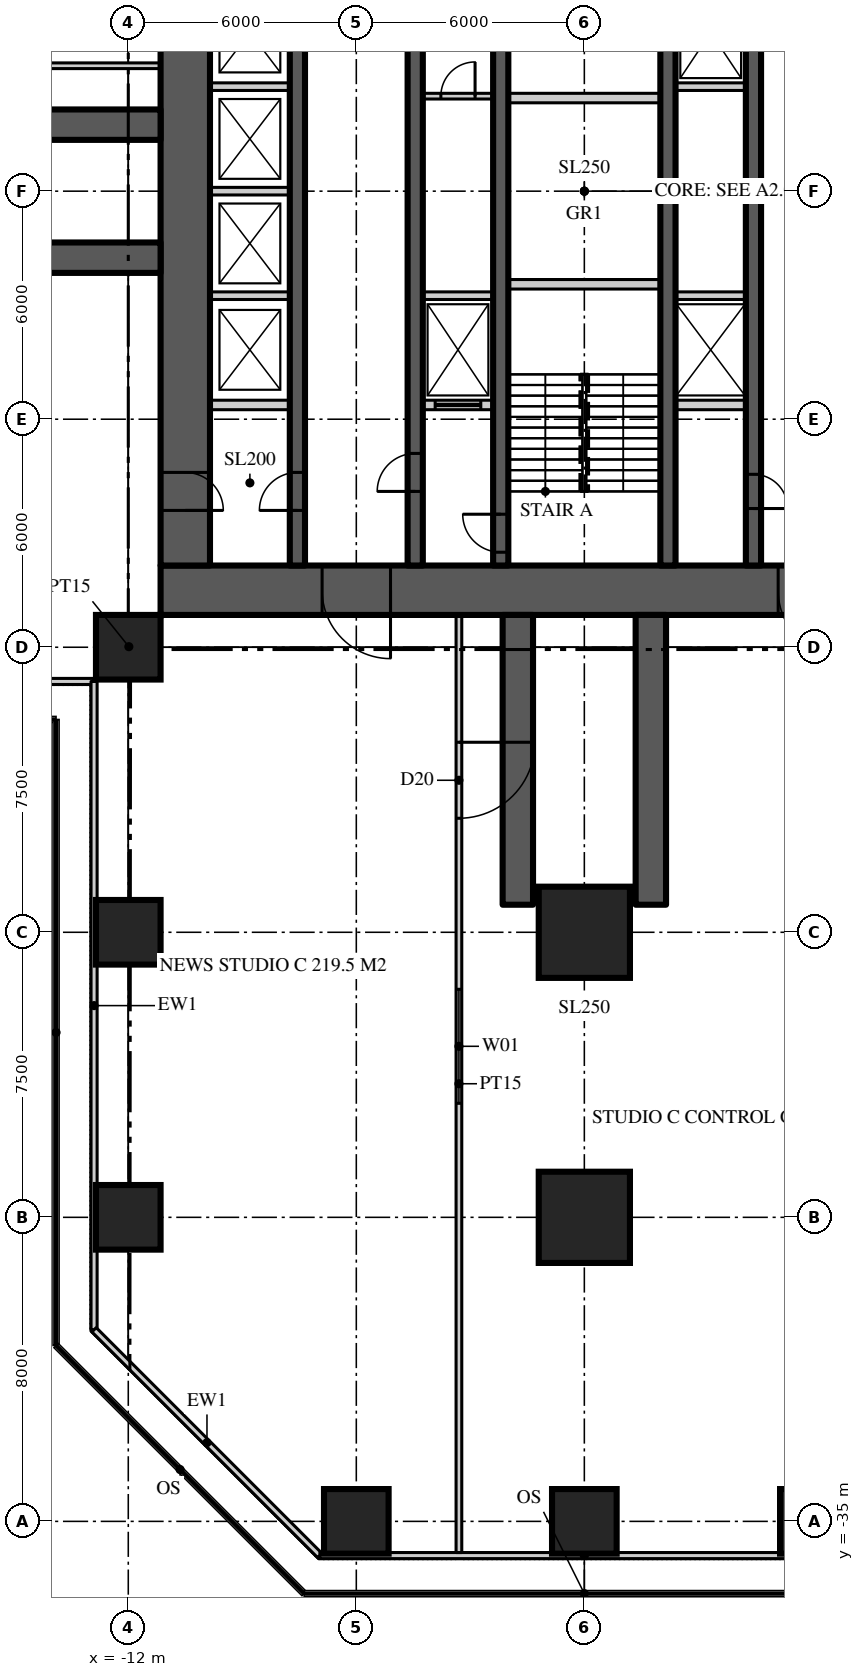
"""IFC4 building model, lengths in metres.
Left out: names, types, materials, properties, quantities, classifications, styles, units other than length and angle.
Written with IfcOpenShell. Run it as: python <this file> out.ifc"""

import sys

from ifc_helpers import new_model, si_unit, direction, frame, frame_2d, origin, origin_2d, place, context, subcontext, project, spatial, rectangle, extrude, element, fill, save


model = new_model("IFC4")
c1 = context("Model", 3, precision=1e-05, world=origin(), true_north=direction((0.0, 1.0)))
c2 = subcontext(c1, "Body", "Model", "MODEL_VIEW")
j1 = project(units=[si_unit("LENGTHUNIT", "METRE"), si_unit("PLANEANGLEUNIT", "RADIAN")], contexts=[c1])
p1 = place(None, origin())
s1 = spatial("IfcSite", under=j1, at=p1, CompositionType="ELEMENT")
p2 = place(p1, origin())
s2 = spatial("IfcBuilding", under=s1, at=p2, CompositionType="ELEMENT")
p3 = place(p2, frame((0.0, 0.0, 7.0)))
s3 = spatial("IfcBuildingStorey", under=s2, at=p3, CompositionType="ELEMENT", Elevation=7.0)
p4 = place(p3, frame((11.15, -10.5, 0.0), z_axis=(0.0, 0.0, 1.0), x_axis=(-1.0, 0.0, 0.0)))
e1 = element("IfcWall", 1, at=p4, inside=s3, PredefinedType="SHEAR", context=c2, shape_type="SweptSolid", body=[
    extrude(rectangle(XDim=22.3, YDim=1.3, at=frame_2d((11.15, 0.0))), origin(), (0.0, 0.0, 1.0), 8.0),
])
p5 = place(p4, frame((16.25, 0.0, 0.0)))
e2 = element("IfcOpeningElement", 2, at=p5, cuts=e1, PredefinedType="OPENING", context=c2, shape_type="SweptSolid", body=[
    extrude(rectangle(XDim=1.8, YDim=2.2, at=frame_2d((0.9, 1.1))), frame((0.0, 0.66, 0.0), z_axis=(0.0, -1.0, 0.0), x_axis=(1.0, 0.0, 0.0)), (0.0, 0.0, 1.0), 1.32),
])
p6 = place(p4, frame((4.25, 0.0, 0.0)))
e3 = element("IfcOpeningElement", 3, at=p6, cuts=e1, PredefinedType="OPENING", context=c2, shape_type="SweptSolid", body=[
    extrude(rectangle(XDim=1.8, YDim=2.2, at=frame_2d((0.9, 1.1))), frame((0.0, 0.66, 0.0), z_axis=(0.0, -1.0, 0.0), x_axis=(1.0, 0.0, 0.0)), (0.0, 0.0, 1.0), 1.32),
])
p7 = place(p3, frame((-10.5, 9.85, 0.0), z_axis=(0.0, 0.0, 1.0), x_axis=(0.0, -1.0, 0.0)))
e4 = element("IfcWall", 4, at=p7, inside=s3, PredefinedType="SHEAR", context=c2, shape_type="SweptSolid", body=[
    extrude(rectangle(XDim=19.7, YDim=1.3, at=frame_2d((9.85, 0.0))), origin(), (0.0, 0.0, 1.0), 8.0),
])
p8 = place(p7, frame((17.25, 0.0, 0.0)))
e5 = element("IfcOpeningElement", 5, at=p8, cuts=e4, PredefinedType="OPENING", context=c2, shape_type="SweptSolid", body=[
    extrude(rectangle(XDim=1.0, YDim=2.2, at=frame_2d((0.5, 1.1))), frame((0.0, 0.66, 0.0), z_axis=(0.0, -1.0, 0.0), x_axis=(1.0, 0.0, 0.0)), (0.0, 0.0, 1.0), 1.32),
])
for number, where, z_axis, x_axis in (
    (6, (-11.15, 1.75, 0.0), (0.0, 0.0, 1.0), (-1.0, 0.0, 0.0)),
    (7, (-11.15, -1.75, 0.0), (0.0, 0.0, 1.0), (-1.0, 0.0, 0.0)),
    (8, (-1.75, -11.15, 0.0), (0.0, 0.0, 1.0), (0.0, -1.0, 0.0)),
    (9, (1.75, -11.15, 0.0), (0.0, 0.0, 1.0), (0.0, -1.0, 0.0)),
):
    element("IfcWall", number, at=place(p3, frame(where, z_axis=z_axis, x_axis=x_axis)), inside=s3, PredefinedType="SHEAR", context=c2, shape_type="SweptSolid", body=[
        extrude(rectangle(XDim=7.625, YDim=0.8, at=frame_2d((3.812, 0.0))), origin(), (0.0, 0.0, 1.0), 8.0),
    ])
for number, where, z_axis, x_axis in (
    (10, (-6.0, -35.0, 0.0), (0.0, 0.0, 1.0), (1.0, 0.0, 0.0)),
    (11, (0.0, -35.0, 0.0), (0.0, 0.0, 1.0), (1.0, 0.0, 0.0)),
    (12, (6.0, -35.0, 0.0), (0.0, 0.0, 1.0), (1.0, 0.0, 0.0)),
    (13, (-12.0, -27.0, 0.0), (0.0, 0.0, 1.0), (1.0, 0.0, 0.0)),
):
    element("IfcColumn", number, at=place(p3, frame(where, z_axis=z_axis, x_axis=x_axis)), inside=s3, PredefinedType="COLUMN", context=c2, shape_type="SweptSolid", body=[
        extrude(rectangle(XDim=1.7, YDim=1.7, at=origin_2d()), origin(), (0.0, 0.0, 1.0), 8.0),
    ])
p9 = place(p3, frame((0.0, -27.0, 0.0), z_axis=(0.0, 0.0, 1.0), x_axis=(1.0, 0.0, 0.0)))
e14 = element("IfcColumn", 14, at=p9, inside=s3, PredefinedType="COLUMN", context=c2, shape_type="SweptSolid", body=[
    extrude(rectangle(XDim=2.4, YDim=2.4, at=origin_2d()), origin(), (0.0, 0.0, 1.0), 8.0),
])
p10 = place(p3, frame((-12.0, -19.5, 0.0), z_axis=(0.0, 0.0, 1.0), x_axis=(1.0, 0.0, 0.0)))
e15 = element("IfcColumn", 15, at=p10, inside=s3, PredefinedType="COLUMN", context=c2, shape_type="SweptSolid", body=[
    extrude(rectangle(XDim=1.7, YDim=1.7, at=origin_2d()), origin(), (0.0, 0.0, 1.0), 8.0),
])
p11 = place(p3, frame((0.0, -19.5, 0.0), z_axis=(0.0, 0.0, 1.0), x_axis=(1.0, 0.0, 0.0)))
e16 = element("IfcColumn", 16, at=p11, inside=s3, PredefinedType="COLUMN", context=c2, shape_type="SweptSolid", body=[
    extrude(rectangle(XDim=2.4, YDim=2.4, at=origin_2d()), origin(), (0.0, 0.0, 1.0), 8.0),
])
p12 = place(p3, frame((-12.0, -12.0, 0.0), z_axis=(0.0, 0.0, 1.0), x_axis=(1.0, 0.0, 0.0)))
e17 = element("IfcColumn", 17, at=p12, inside=s3, PredefinedType="COLUMN", context=c2, shape_type="SweptSolid", body=[
    extrude(rectangle(XDim=1.7, YDim=1.7, at=origin_2d()), origin(), (0.0, 0.0, 1.0), 8.0),
])
for number, where, z_axis, x_axis in (
    (18, (-29.958, -12.9, 0.0), (0.0, 0.0, 1.0), (1.0, 0.0, 0.0)),
    (19, (-12.9, -12.9, 0.0), (0.0, 0.0, 1.0), (0.0, -1.0, 0.0)),
):
    element("IfcWall", number, at=place(p3, frame(where, z_axis=z_axis, x_axis=x_axis)), inside=s3, PredefinedType="SOLIDWALL", context=c2, shape_type="SweptSolid", body=[
        extrude(rectangle(XDim=17.059, YDim=0.16, at=frame_2d((8.529, 0.0))), origin(), (0.0, 0.0, 1.0), 7.75),
    ])
p13 = place(p3, frame((-12.9, -29.958, 0.0), z_axis=(0.0, 0.0, 1.0), x_axis=(0.707106781187, -0.707106781187, 0.0)))
e20 = element("IfcWall", 20, at=p13, inside=s3, PredefinedType="SOLIDWALL", context=c2, shape_type="SweptSolid", body=[
    extrude(rectangle(XDim=8.402, YDim=0.16, at=frame_2d((4.201, 0.0))), origin(), (0.0, 0.0, 1.0), 7.75),
])
p14 = place(p3, frame((-6.958, -35.9, 0.0), z_axis=(0.0, 0.0, 1.0), x_axis=(1.0, 0.0, 0.0)))
e21 = element("IfcWall", 21, at=p14, inside=s3, PredefinedType="SOLIDWALL", context=c2, shape_type="SweptSolid", body=[
    extrude(rectangle(XDim=13.917, YDim=0.16, at=frame_2d((6.958, 0.0))), origin(), (0.0, 0.0, 1.0), 7.75),
])
p15 = place(p3, frame((-7.55, -9.85, 0.0), z_axis=(0.0, 0.0, 1.0), x_axis=(0.0, 1.0, 0.0)))
e22 = element("IfcWall", 22, at=p15, inside=s3, PredefinedType="SHEAR", context=c2, shape_type="SweptSolid", body=[
    extrude(rectangle(XDim=19.7, YDim=0.4, at=frame_2d((9.85, 0.0))), origin(), (0.0, 0.0, 1.0), 8.0),
])
p16 = place(p15, frame((1.45, 0.0, 0.0)))
e23 = element("IfcOpeningElement", 23, at=p16, cuts=e22, PredefinedType="OPENING", context=c2, shape_type="SweptSolid", body=[
    extrude(rectangle(XDim=1.0, YDim=2.2, at=frame_2d((0.5, 1.1))), frame((0.0, 0.21, 0.0), z_axis=(0.0, -1.0, 0.0), x_axis=(1.0, 0.0, 0.0)), (0.0, 0.0, 1.0), 0.42),
])
p17 = place(p15, frame((17.3, 0.0, 0.0)))
e24 = element("IfcOpeningElement", 24, at=p17, cuts=e22, PredefinedType="OPENING", context=c2, shape_type="SweptSolid", body=[
    extrude(rectangle(XDim=0.9, YDim=2.1, at=frame_2d((0.45, 1.05))), frame((0.0, 0.21, 0.0), z_axis=(0.0, -1.0, 0.0), x_axis=(1.0, 0.0, 0.0)), (0.0, 0.0, 1.0), 0.42),
])
p18 = place(p3, frame((-4.45, -9.85, 0.0), z_axis=(0.0, 0.0, 1.0), x_axis=(0.0, 1.0, 0.0)))
e25 = element("IfcWall", 25, at=p18, inside=s3, PredefinedType="SHEAR", context=c2, shape_type="SweptSolid", body=[
    extrude(rectangle(XDim=19.7, YDim=0.4, at=frame_2d((9.85, 0.0))), origin(), (0.0, 0.0, 1.0), 8.0),
])
p19 = place(p18, frame((1.95, 0.0, 0.0)))
e26 = element("IfcOpeningElement", 26, at=p19, cuts=e25, PredefinedType="OPENING", context=c2, shape_type="SweptSolid", body=[
    extrude(rectangle(XDim=1.0, YDim=2.2, at=frame_2d((0.5, 1.1))), frame((0.0, 0.21, 0.0), z_axis=(0.0, -1.0, 0.0), x_axis=(1.0, 0.0, 0.0)), (0.0, 0.0, 1.0), 0.42),
])
p20 = place(p18, frame((17.25, 0.0, 0.0)))
e27 = element("IfcOpeningElement", 27, at=p20, cuts=e25, PredefinedType="OPENING", context=c2, shape_type="SweptSolid", body=[
    extrude(rectangle(XDim=1.0, YDim=2.1, at=frame_2d((0.5, 1.05))), frame((0.0, 0.21, 0.0), z_axis=(0.0, -1.0, 0.0), x_axis=(1.0, 0.0, 0.0)), (0.0, 0.0, 1.0), 0.42),
])
p21 = place(p3, frame((4.45, 9.85, 0.0), z_axis=(0.0, 0.0, 1.0), x_axis=(0.0, -1.0, 0.0)))
e28 = element("IfcWall", 28, at=p21, inside=s3, PredefinedType="SHEAR", context=c2, shape_type="SweptSolid", body=[
    extrude(rectangle(XDim=19.7, YDim=0.4, at=frame_2d((9.85, 0.0))), origin(), (0.0, 0.0, 1.0), 8.0),
])
p22 = place(p21, frame((1.95, 0.0, 0.0)))
e29 = element("IfcOpeningElement", 29, at=p22, cuts=e28, PredefinedType="OPENING", context=c2, shape_type="SweptSolid", body=[
    extrude(rectangle(XDim=1.0, YDim=2.2, at=frame_2d((0.5, 1.1))), frame((0.0, 0.21, 0.0), z_axis=(0.0, -1.0, 0.0), x_axis=(1.0, 0.0, 0.0)), (0.0, 0.0, 1.0), 0.42),
])
p23 = place(p21, frame((17.3, 0.0, 0.0)))
e30 = element("IfcOpeningElement", 30, at=p23, cuts=e28, PredefinedType="OPENING", context=c2, shape_type="SweptSolid", body=[
    extrude(rectangle(XDim=0.9, YDim=2.1, at=frame_2d((0.45, 1.05))), frame((0.0, 0.21, 0.0), z_axis=(0.0, -1.0, 0.0), x_axis=(1.0, 0.0, 0.0)), (0.0, 0.0, 1.0), 0.42),
])
p24 = place(p3, frame((-2.2, -9.85, 0.0), z_axis=(0.0, 0.0, 1.0), x_axis=(0.0, 1.0, 0.0)))
e31 = element("IfcWall", 31, at=p24, inside=s3, PredefinedType="SHEAR", context=c2, shape_type="SweptSolid", body=[
    extrude(rectangle(XDim=19.7, YDim=0.4, at=frame_2d((9.85, 0.0))), origin(), (0.0, 0.0, 1.0), 8.0),
])
p25 = place(p24, frame((0.35, 0.0, 0.0)))
e32 = element("IfcOpeningElement", 32, at=p25, cuts=e31, PredefinedType="OPENING", context=c2, shape_type="SweptSolid", body=[
    extrude(rectangle(XDim=1.0, YDim=2.2, at=frame_2d((0.5, 1.1))), frame((0.0, 0.21, 0.0), z_axis=(0.0, -1.0, 0.0), x_axis=(1.0, 0.0, 0.0)), (0.0, 0.0, 1.0), 0.42),
])
p26 = place(p3, frame((2.2, 9.85, 0.0), z_axis=(0.0, 0.0, 1.0), x_axis=(0.0, -1.0, 0.0)))
e33 = element("IfcWall", 33, at=p26, inside=s3, PredefinedType="SHEAR", context=c2, shape_type="SweptSolid", body=[
    extrude(rectangle(XDim=19.7, YDim=0.4, at=frame_2d((9.85, 0.0))), origin(), (0.0, 0.0, 1.0), 8.0),
])
p27 = place(p26, frame((0.35, 0.0, 0.0)))
e34 = element("IfcOpeningElement", 34, at=p27, cuts=e33, PredefinedType="OPENING", context=c2, shape_type="SweptSolid", body=[
    extrude(rectangle(XDim=1.0, YDim=2.2, at=frame_2d((0.5, 1.1))), frame((0.0, 0.21, 0.0), z_axis=(0.0, -1.0, 0.0), x_axis=(1.0, 0.0, 0.0)), (0.0, 0.0, 1.0), 0.42),
])
p28 = place(p3, frame((-9.85, -5.625, 0.0), z_axis=(0.0, 0.0, 1.0), x_axis=(1.0, 0.0, 0.0)))
e35 = element("IfcWall", 35, at=p28, inside=s3, PredefinedType="SOLIDWALL", context=c2, shape_type="SweptSolid", body=[
    extrude(rectangle(XDim=2.1, YDim=0.25, at=frame_2d((1.05, 0.0))), origin(), (0.0, 0.0, 1.0), 7.8),
])
p29 = place(p3, frame((-4.25, -5.625, 0.0), z_axis=(0.0, 0.0, 1.0), x_axis=(1.0, 0.0, 0.0)))
e36 = element("IfcWall", 36, at=p29, inside=s3, PredefinedType="SOLIDWALL", context=c2, shape_type="SweptSolid", body=[
    extrude(rectangle(XDim=1.85, YDim=0.25, at=frame_2d((0.925, 0.0))), origin(), (0.0, 0.0, 1.0), 7.8),
])
p30 = place(p29, frame((0.325, 0.0, 0.0)))
e37 = element("IfcOpeningElement", 37, at=p30, cuts=e36, PredefinedType="OPENING", context=c2, shape_type="SweptSolid", body=[
    extrude(rectangle(XDim=1.2, YDim=2.2, at=frame_2d((0.6, 1.1))), frame((0.0, 0.135, 0.0), z_axis=(0.0, -1.0, 0.0), x_axis=(1.0, 0.0, 0.0)), (0.0, 0.0, 1.0), 0.27),
])
p31 = place(p3, frame((2.4, -5.625, 0.0), z_axis=(0.0, 0.0, 1.0), x_axis=(1.0, 0.0, 0.0)))
e38 = element("IfcWall", 38, at=p31, inside=s3, PredefinedType="SOLIDWALL", context=c2, shape_type="SweptSolid", body=[
    extrude(rectangle(XDim=1.85, YDim=0.25, at=frame_2d((0.925, 0.0))), origin(), (0.0, 0.0, 1.0), 7.8),
])
for number, where, z_axis, x_axis in (
    (39, (-2.0, -2.45, 0.0), (0.0, 0.0, 1.0), (1.0, 0.0, 0.0)),
    (40, (-2.0, 2.45, 0.0), (0.0, 0.0, 1.0), (1.0, 0.0, 0.0)),
):
    element("IfcWall", number, at=place(p3, frame(where, z_axis=z_axis, x_axis=x_axis)), inside=s3, PredefinedType="SOLIDWALL", context=c2, shape_type="SweptSolid", body=[
        extrude(rectangle(XDim=4.0, YDim=0.25, at=frame_2d((2.0, 0.0))), origin(), (0.0, 0.0, 1.0), 7.8),
    ])
p32 = place(p3, frame((-9.85, -2.75, 0.0), z_axis=(0.0, 0.0, 1.0), x_axis=(1.0, 0.0, 0.0)))
e41 = element("IfcWall", 41, at=p32, inside=s3, PredefinedType="SOLIDWALL", context=c2, shape_type="SweptSolid", body=[
    extrude(rectangle(XDim=2.1, YDim=0.2, at=frame_2d((1.05, 0.0))), origin(), (0.0, 0.0, 1.0), 7.8),
])
for number, where, z_axis, x_axis in (
    (42, (-4.25, -2.75, 0.0), (0.0, 0.0, 1.0), (1.0, 0.0, 0.0)),
    (43, (2.4, -2.75, 0.0), (0.0, 0.0, 1.0), (1.0, 0.0, 0.0)),
):
    element("IfcWall", number, at=place(p3, frame(where, z_axis=z_axis, x_axis=x_axis)), inside=s3, PredefinedType="SOLIDWALL", context=c2, shape_type="SweptSolid", body=[
        extrude(rectangle(XDim=1.85, YDim=0.2, at=frame_2d((0.925, 0.0))), origin(), (0.0, 0.0, 1.0), 7.8),
    ])
for number, where, z_axis, x_axis in (
    (44, (-9.85, 0.0, 0.0), (0.0, 0.0, 1.0), (1.0, 0.0, 0.0)),
    (45, (-9.85, 2.75, 0.0), (0.0, 0.0, 1.0), (1.0, 0.0, 0.0)),
):
    element("IfcWall", number, at=place(p3, frame(where, z_axis=z_axis, x_axis=x_axis)), inside=s3, PredefinedType="SOLIDWALL", context=c2, shape_type="SweptSolid", body=[
        extrude(rectangle(XDim=2.1, YDim=0.2, at=frame_2d((1.05, 0.0))), origin(), (0.0, 0.0, 1.0), 7.8),
    ])
p33 = place(p3, frame((2.4, 2.75, 0.0), z_axis=(0.0, 0.0, 1.0), x_axis=(1.0, 0.0, 0.0)))
e46 = element("IfcWall", 46, at=p33, inside=s3, PredefinedType="SOLIDWALL", context=c2, shape_type="SweptSolid", body=[
    extrude(rectangle(XDim=1.85, YDim=0.2, at=frame_2d((0.925, 0.0))), origin(), (0.0, 0.0, 1.0), 7.8),
])
p34 = place(p3, frame((-11.15, 3.3, 0.0), z_axis=(0.0, 0.0, 1.0), x_axis=(-1.0, 0.0, 0.0)))
e47 = element("IfcWall", 47, at=p34, inside=s3, PredefinedType="PARTITIONING", context=c2, shape_type="SweptSolid", body=[
    extrude(rectangle(XDim=24.67, YDim=0.15, at=frame_2d((12.335, 0.0))), origin(), (0.0, 0.0, 1.0), 7.75),
])
p35 = place(p34, frame((3.35, 0.0, 0.0)))
e48 = element("IfcOpeningElement", 48, at=p35, cuts=e47, PredefinedType="OPENING", context=c2, shape_type="SweptSolid", body=[
    extrude(rectangle(XDim=2.0, YDim=2.6, at=frame_2d((1.0, 1.3))), frame((0.0, 0.085, 0.0), z_axis=(0.0, -1.0, 0.0), x_axis=(1.0, 0.0, 0.0)), (0.0, 0.0, 1.0), 0.17),
])
p36 = place(p34, frame((9.85, 0.0, 0.9)))
e49 = element("IfcOpeningElement", 49, at=p36, cuts=e47, PredefinedType="OPENING", context=c2, shape_type="SweptSolid", body=[
    extrude(rectangle(XDim=3.0, YDim=1.5, at=frame_2d((1.5, 0.75))), frame((0.0, 0.085, 0.0), z_axis=(0.0, -1.0, 0.0), x_axis=(1.0, 0.0, 0.0)), (0.0, 0.0, 1.0), 0.17),
])
p37 = place(p3, frame((-3.3, -11.15, 0.0), z_axis=(0.0, 0.0, 1.0), x_axis=(0.0, -1.0, 0.0)))
e50 = element("IfcWall", 50, at=p37, inside=s3, PredefinedType="PARTITIONING", context=c2, shape_type="SweptSolid", body=[
    extrude(rectangle(XDim=24.67, YDim=0.15, at=frame_2d((12.335, 0.0))), origin(), (0.0, 0.0, 1.0), 7.75),
])
p38 = place(p37, frame((3.35, 0.0, 0.0)))
e51 = element("IfcOpeningElement", 51, at=p38, cuts=e50, PredefinedType="OPENING", context=c2, shape_type="SweptSolid", body=[
    extrude(rectangle(XDim=2.0, YDim=2.6, at=frame_2d((1.0, 1.3))), frame((0.0, 0.085, 0.0), z_axis=(0.0, -1.0, 0.0), x_axis=(1.0, 0.0, 0.0)), (0.0, 0.0, 1.0), 0.17),
])
p39 = place(p37, frame((9.85, 0.0, 0.9)))
e52 = element("IfcOpeningElement", 52, at=p39, cuts=e50, PredefinedType="OPENING", context=c2, shape_type="SweptSolid", body=[
    extrude(rectangle(XDim=3.0, YDim=1.5, at=frame_2d((1.5, 0.75))), frame((0.0, 0.085, 0.0), z_axis=(0.0, -1.0, 0.0), x_axis=(1.0, 0.0, 0.0)), (0.0, 0.0, 1.0), 0.17),
])
p40 = place(p3, frame((-11.15, -11.15, 0.0), z_axis=(0.0, 0.0, 1.0), x_axis=(-0.707106781187, -0.707106781187, 0.0)))
e53 = element("IfcWall", 53, at=p40, inside=s3, PredefinedType="PARTITIONING", context=c2, shape_type="SweptSolid", body=[
    extrude(rectangle(XDim=2.362, YDim=0.15, at=frame_2d((1.181, 0.0))), origin(), (0.0, 0.0, 1.0), 7.75),
])
p41 = place(p3, frame((-4.25, 2.5, 0.0), z_axis=(0.0, 0.0, 1.0), x_axis=(1.0, 0.0, 0.0)))
e54 = element("IfcWall", 54, at=p41, inside=s3, PredefinedType="SOLIDWALL", context=c2, shape_type="SweptSolid", body=[
    extrude(rectangle(XDim=1.85, YDim=0.15, at=frame_2d((0.925, 0.0))), origin(), (0.0, 0.0, 1.0), 7.75),
])
p42 = place(p41, frame((0.475, 0.0, 0.0)))
e55 = element("IfcOpeningElement", 55, at=p42, cuts=e54, PredefinedType="OPENING", context=c2, shape_type="SweptSolid", body=[
    extrude(rectangle(XDim=0.9, YDim=2.1, at=frame_2d((0.45, 1.05))), frame((0.0, 0.085, 0.0), z_axis=(0.0, -1.0, 0.0), x_axis=(1.0, 0.0, 0.0)), (0.0, 0.0, 1.0), 0.17),
])
p43 = place(p5, origin())
e56 = element("IfcDoor", 56, at=p43, inside=s3, OperationType="DOUBLE_DOOR_DOUBLE_SWING", PredefinedType="DOOR", context=c2, shape_type="SweptSolid", body=[
    extrude(rectangle(XDim=1.8, YDim=2.2, at=frame_2d((0.9, 1.1))), frame((0.0, 0.025, 0.0), z_axis=(0.0, -1.0, 0.0), x_axis=(1.0, 0.0, 0.0)), (0.0, 0.0, 1.0), 0.05),
])
fill(e2, e56)
p44 = place(p6, origin())
e57 = element("IfcDoor", 57, at=p44, inside=s3, OperationType="DOUBLE_DOOR_DOUBLE_SWING", PredefinedType="DOOR", context=c2, shape_type="SweptSolid", body=[
    extrude(rectangle(XDim=1.8, YDim=2.2, at=frame_2d((0.9, 1.1))), frame((0.0, 0.025, 0.0), z_axis=(0.0, -1.0, 0.0), x_axis=(1.0, 0.0, 0.0)), (0.0, 0.0, 1.0), 0.05),
])
fill(e3, e57)
p45 = place(p16, origin())
e58 = element("IfcDoor", 58, at=p45, inside=s3, OperationType="SINGLE_SWING_LEFT", PredefinedType="DOOR", context=c2, shape_type="SweptSolid", body=[
    extrude(rectangle(XDim=1.0, YDim=2.2, at=frame_2d((0.5, 1.1))), frame((0.0, 0.025, 0.0), z_axis=(0.0, -1.0, 0.0), x_axis=(1.0, 0.0, 0.0)), (0.0, 0.0, 1.0), 0.05),
])
fill(e23, e58)
p46 = place(p8, origin())
e59 = element("IfcDoor", 59, at=p46, inside=s3, OperationType="SINGLE_SWING_RIGHT", PredefinedType="DOOR", context=c2, shape_type="SweptSolid", body=[
    extrude(rectangle(XDim=1.0, YDim=2.2, at=frame_2d((0.5, 1.1))), frame((0.0, 0.025, 0.0), z_axis=(0.0, -1.0, 0.0), x_axis=(1.0, 0.0, 0.0)), (0.0, 0.0, 1.0), 0.05),
])
fill(e5, e59)
p47 = place(p19, origin())
e60 = element("IfcDoor", 60, at=p47, inside=s3, OperationType="SINGLE_SWING_LEFT", PredefinedType="DOOR", context=c2, shape_type="SweptSolid", body=[
    extrude(rectangle(XDim=1.0, YDim=2.2, at=frame_2d((0.5, 1.1))), frame((0.0, 0.025, 0.0), z_axis=(0.0, -1.0, 0.0), x_axis=(1.0, 0.0, 0.0)), (0.0, 0.0, 1.0), 0.05),
])
fill(e26, e60)
p48 = place(p25, origin())
e61 = element("IfcDoor", 61, at=p48, inside=s3, OperationType="SINGLE_SWING_RIGHT", PredefinedType="DOOR", context=c2, shape_type="SweptSolid", body=[
    extrude(rectangle(XDim=1.0, YDim=2.2, at=frame_2d((0.5, 1.1))), frame((0.0, 0.025, 0.0), z_axis=(0.0, -1.0, 0.0), x_axis=(1.0, 0.0, 0.0)), (0.0, 0.0, 1.0), 0.05),
])
fill(e32, e61)
p49 = place(p23, origin())
e62 = element("IfcDoor", 62, at=p49, inside=s3, OperationType="SINGLE_SWING_RIGHT", PredefinedType="DOOR", context=c2, shape_type="SweptSolid", body=[
    extrude(rectangle(XDim=0.9, YDim=2.1, at=frame_2d((0.45, 1.05))), frame((0.0, 0.025, 0.0), z_axis=(0.0, -1.0, 0.0), x_axis=(1.0, 0.0, 0.0)), (0.0, 0.0, 1.0), 0.05),
])
fill(e30, e62)
p50 = place(p30, origin())
e63 = element("IfcDoor", 63, at=p50, inside=s3, OperationType="SLIDING_TO_LEFT", PredefinedType="DOOR", context=c2, shape_type="SweptSolid", body=[
    extrude(rectangle(XDim=1.2, YDim=2.2, at=frame_2d((0.6, 1.1))), frame((0.0, 0.025, 0.0), z_axis=(0.0, -1.0, 0.0), x_axis=(1.0, 0.0, 0.0)), (0.0, 0.0, 1.0), 0.05),
])
fill(e37, e63)
p51 = place(p38, origin())
e64 = element("IfcDoor", 64, at=p51, inside=s3, OperationType="DOUBLE_DOOR_DOUBLE_SWING", PredefinedType="DOOR", context=c2, shape_type="SweptSolid", body=[
    extrude(rectangle(XDim=2.0, YDim=2.6, at=frame_2d((1.0, 1.3))), frame((0.0, 0.025, 0.0), z_axis=(0.0, -1.0, 0.0), x_axis=(1.0, 0.0, 0.0)), (0.0, 0.0, 1.0), 0.05),
])
fill(e51, e64)
p52 = place(p42, origin())
e65 = element("IfcDoor", 65, at=p52, inside=s3, OperationType="SINGLE_SWING_RIGHT", PredefinedType="DOOR", context=c2, shape_type="SweptSolid", body=[
    extrude(rectangle(XDim=0.9, YDim=2.1, at=frame_2d((0.45, 1.05))), frame((0.0, 0.025, 0.0), z_axis=(0.0, -1.0, 0.0), x_axis=(1.0, 0.0, 0.0)), (0.0, 0.0, 1.0), 0.05),
])
fill(e55, e65)
p53 = place(p39, origin())
e66 = element("IfcWindow", 66, at=p53, inside=s3, PartitioningType="SINGLE_PANEL", PredefinedType="WINDOW", context=c2, shape_type="SweptSolid", body=[
    extrude(rectangle(XDim=3.0, YDim=1.5, at=frame_2d((1.5, 0.75))), frame((0.0, 0.03, 0.0), z_axis=(0.0, -1.0, 0.0), x_axis=(1.0, 0.0, 0.0)), (0.0, 0.0, 1.0), 0.06),
])
fill(e52, e66)
save(model, sys.argv[1])
